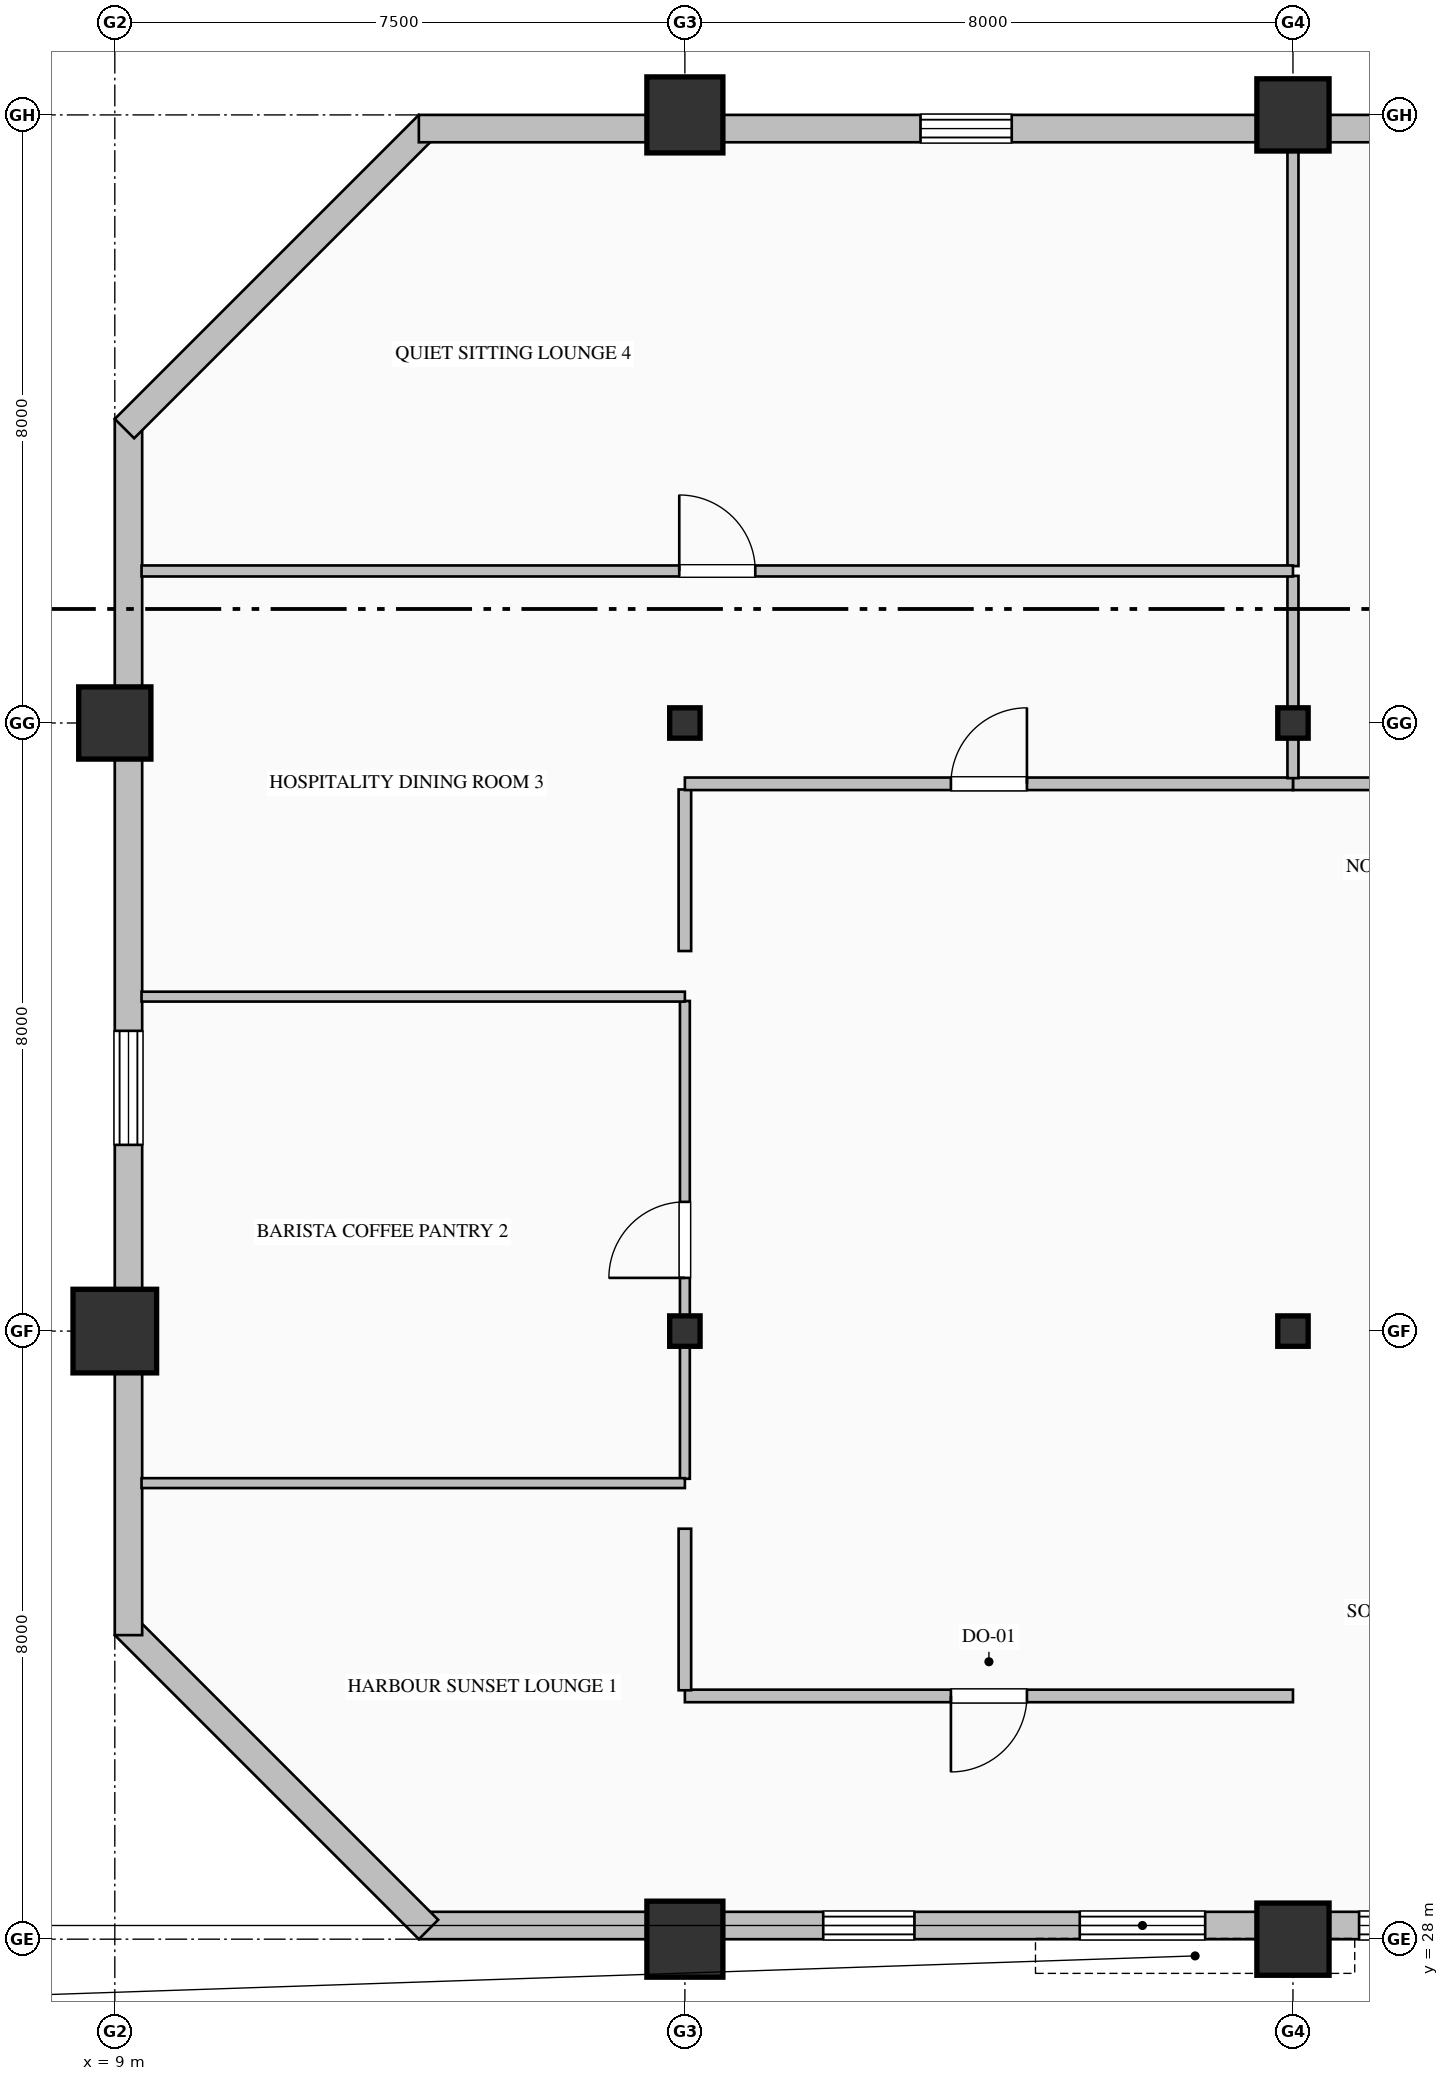
"""IFC4 building model, lengths in metres.
Left out: names, types, materials, properties, quantities, classifications, styles, units other than length and angle.
Written with IfcOpenShell. Run it as: python <this file> out.ifc"""

import sys

from ifc_helpers import new_model, si_unit, direction, frame, frame_2d, origin, origin_2d, place, context, subcontext, project, spatial, rectangle, hollow_rectangle, hollow_circle, i_section, extrude, element, fill, save


model = new_model("IFC4")
c1 = context("Model", 3, precision=1e-05, world=origin(), true_north=direction((0.0, 1.0)))
c2 = subcontext(c1, "Body", "Model", "MODEL_VIEW")
j1 = project(units=[si_unit("LENGTHUNIT", "METRE"), si_unit("PLANEANGLEUNIT", "RADIAN")], contexts=[c1])
p1 = place(None, origin())
s1 = spatial("IfcSite", under=j1, at=p1, CompositionType="ELEMENT")
p2 = place(p1, origin())
s2 = spatial("IfcBuilding", under=s1, at=p2, CompositionType="ELEMENT")
p3 = place(p2, frame((0.0, 0.0, 159.0)))
s3 = spatial("IfcBuildingStorey", under=s2, at=p3, CompositionType="ELEMENT", Elevation=159.0)
p4 = place(p3, frame((9.0, 36.0, 0.0), z_axis=(0.0, 0.0, 1.0), x_axis=(1.0, 0.0, 0.0)))
e1 = element("IfcColumn", 1, at=p4, inside=s3, PredefinedType="COLUMN", context=c2, shape_type="SweptSolid", body=[
    extrude(hollow_rectangle(XDim=1.1, YDim=1.1, WallThickness=0.04, at=origin_2d()), origin(), (0.0, 0.0, 1.0), 4.0),
])
p5 = place(p3, frame((9.0, 44.0, 0.0), z_axis=(0.0, 0.0, 1.0), x_axis=(1.0, 0.0, 0.0)))
e2 = element("IfcColumn", 2, at=p5, inside=s3, PredefinedType="COLUMN", context=c2, shape_type="SweptSolid", body=[
    extrude(hollow_rectangle(XDim=0.95, YDim=0.95, WallThickness=0.036, at=origin_2d()), origin(), (0.0, 0.0, 1.0), 4.0),
])
p6 = place(p3, frame((16.5, 28.0, 0.0), z_axis=(0.0, 0.0, 1.0), x_axis=(1.0, 0.0, 0.0)))
e3 = element("IfcColumn", 3, at=p6, inside=s3, PredefinedType="COLUMN", context=c2, shape_type="SweptSolid", body=[
    extrude(hollow_circle(Radius=0.5, WallThickness=0.036, at=origin_2d()), origin(), (0.0, 0.0, 1.0), 4.0),
])
for number, where, z_axis, x_axis in (
    (4, (16.5, 36.0, 0.0), (0.0, 0.0, 1.0), (1.0, 0.0, 0.0)),
    (5, (16.5, 44.0, 0.0), (0.0, 0.0, 1.0), (1.0, 0.0, 0.0)),
):
    element("IfcColumn", number, at=place(p3, frame(where, z_axis=z_axis, x_axis=x_axis)), inside=s3, PredefinedType="COLUMN", context=c2, shape_type="SweptSolid", body=[
        extrude(i_section(OverallWidth=0.4, OverallDepth=0.4, WebThickness=0.013, FlangeThickness=0.021, FilletRadius=0.022, at=origin_2d()), origin(), (0.0, 0.0, 1.0), 4.0),
    ])
p7 = place(p3, frame((16.5, 52.0, 0.0), z_axis=(0.0, 0.0, 1.0), x_axis=(1.0, 0.0, 0.0)))
e6 = element("IfcColumn", 6, at=p7, inside=s3, PredefinedType="COLUMN", context=c2, shape_type="SweptSolid", body=[
    extrude(hollow_circle(Radius=0.5, WallThickness=0.036, at=origin_2d()), origin(), (0.0, 0.0, 1.0), 4.0),
])
p8 = place(p3, frame((24.5, 28.0, 0.0), z_axis=(0.0, 0.0, 1.0), x_axis=(1.0, 0.0, 0.0)))
e7 = element("IfcColumn", 7, at=p8, inside=s3, PredefinedType="COLUMN", context=c2, shape_type="SweptSolid", body=[
    extrude(hollow_rectangle(XDim=0.95, YDim=0.95, WallThickness=0.036, at=origin_2d()), origin(), (0.0, 0.0, 1.0), 4.0),
])
for number, where, z_axis, x_axis in (
    (8, (24.5, 36.0, 0.0), (0.0, 0.0, 1.0), (1.0, 0.0, 0.0)),
    (9, (24.5, 44.0, 0.0), (0.0, 0.0, 1.0), (1.0, 0.0, 0.0)),
):
    element("IfcColumn", number, at=place(p3, frame(where, z_axis=z_axis, x_axis=x_axis)), inside=s3, PredefinedType="COLUMN", context=c2, shape_type="SweptSolid", body=[
        extrude(i_section(OverallWidth=0.4, OverallDepth=0.4, WebThickness=0.013, FlangeThickness=0.021, FilletRadius=0.022, at=origin_2d()), origin(), (0.0, 0.0, 1.0), 4.0),
    ])
p9 = place(p3, frame((24.5, 52.0, 0.0), z_axis=(0.0, 0.0, 1.0), x_axis=(1.0, 0.0, 0.0)))
e10 = element("IfcColumn", 10, at=p9, inside=s3, PredefinedType="COLUMN", context=c2, shape_type="SweptSolid", body=[
    extrude(hollow_rectangle(XDim=0.95, YDim=0.95, WallThickness=0.036, at=origin_2d()), origin(), (0.0, 0.0, 1.0), 4.0),
])
p10 = place(p3, frame((40.52, 28.18, 0.0), z_axis=(0.0, 0.0, 1.0), x_axis=(-1.0, 0.0, 0.0)))
e11 = element("IfcWall", 11, at=p10, inside=s3, PredefinedType="SOLIDWALL", context=c2, shape_type="SweptSolid", body=[
    extrude(rectangle(XDim=27.52, YDim=0.36, at=frame_2d((13.76, 0.0))), origin(), (0.0, 0.0, 1.0), 3.165),
])
p11 = place(p10, frame((2.85, 0.0, 0.85)))
e12 = element("IfcOpeningElement", 12, at=p11, cuts=e11, PredefinedType="OPENING", context=c2, shape_type="SweptSolid", body=[
    extrude(rectangle(XDim=1.5, YDim=1.95, at=frame_2d((0.75, 0.975))), frame((0.0, 0.19, 0.0), z_axis=(0.0, -1.0, 0.0), x_axis=(1.0, 0.0, 0.0)), (0.0, 0.0, 1.0), 0.38),
])
p12 = place(p10, frame((10.2, 0.0, 0.7)))
e13 = element("IfcOpeningElement", 13, at=p12, cuts=e11, PredefinedType="OPENING", context=c2, shape_type="SweptSolid", body=[
    extrude(rectangle(XDim=1.2, YDim=1.85, at=frame_2d((0.6, 0.925))), frame((0.0, 0.19, 0.0), z_axis=(0.0, -1.0, 0.0), x_axis=(1.0, 0.0, 0.0)), (0.0, 0.0, 1.0), 0.38),
])
p13 = place(p10, frame((13.65, 0.0, 0.85)))
e14 = element("IfcOpeningElement", 14, at=p13, cuts=e11, PredefinedType="OPENING", context=c2, shape_type="SweptSolid", body=[
    extrude(rectangle(XDim=1.5, YDim=1.95, at=frame_2d((0.75, 0.975))), frame((0.0, 0.19, 0.0), z_axis=(0.0, -1.0, 0.0), x_axis=(1.0, 0.0, 0.0)), (0.0, 0.0, 1.0), 0.38),
])
p14 = place(p10, frame((17.175, 0.0, 0.85)))
e15 = element("IfcOpeningElement", 15, at=p14, cuts=e11, PredefinedType="OPENING", context=c2, shape_type="SweptSolid", body=[
    extrude(rectangle(XDim=1.65, YDim=1.95, at=frame_2d((0.825, 0.975))), frame((0.0, 0.19, 0.0), z_axis=(0.0, -1.0, 0.0), x_axis=(1.0, 0.0, 0.0)), (0.0, 0.0, 1.0), 0.38),
])
p15 = place(p10, frame((21.0, 0.0, 0.7)))
e16 = element("IfcOpeningElement", 16, at=p15, cuts=e11, PredefinedType="OPENING", context=c2, shape_type="SweptSolid", body=[
    extrude(rectangle(XDim=1.2, YDim=1.85, at=frame_2d((0.6, 0.925))), frame((0.0, 0.19, 0.0), z_axis=(0.0, -1.0, 0.0), x_axis=(1.0, 0.0, 0.0)), (0.0, 0.0, 1.0), 0.38),
])
p16 = place(p3, frame((13.127, 28.127, 0.0), z_axis=(0.0, 0.0, 1.0), x_axis=(-0.707106781187, 0.707106781187, 0.0)))
e17 = element("IfcWall", 17, at=p16, inside=s3, PredefinedType="SOLIDWALL", context=c2, shape_type="SweptSolid", body=[
    extrude(rectangle(XDim=5.657, YDim=0.36, at=frame_2d((2.828, 0.0))), origin(), (0.0, 0.0, 1.0), 3.765),
])
p17 = place(p3, frame((9.18, 32.0, 0.0), z_axis=(0.0, 0.0, 1.0), x_axis=(0.0, 1.0, 0.0)))
e18 = element("IfcWall", 18, at=p17, inside=s3, PredefinedType="SOLIDWALL", context=c2, shape_type="SweptSolid", body=[
    extrude(rectangle(XDim=16.0, YDim=0.36, at=frame_2d((8.0, 0.0))), origin(), (0.0, 0.0, 1.0), 3.265),
])
p18 = place(p17, frame((6.45, 0.0, 0.85)))
e19 = element("IfcOpeningElement", 19, at=p18, cuts=e18, PredefinedType="OPENING", context=c2, shape_type="SweptSolid", body=[
    extrude(rectangle(XDim=1.5, YDim=1.95, at=frame_2d((0.75, 0.975))), frame((0.0, 0.19, 0.0), z_axis=(0.0, -1.0, 0.0), x_axis=(1.0, 0.0, 0.0)), (0.0, 0.0, 1.0), 0.38),
])
p19 = place(p3, frame((9.127, 47.873, 0.0), z_axis=(0.0, 0.0, 1.0), x_axis=(0.707106781187, 0.707106781187, 0.0)))
e20 = element("IfcWall", 20, at=p19, inside=s3, PredefinedType="SOLIDWALL", context=c2, shape_type="SweptSolid", body=[
    extrude(rectangle(XDim=5.657, YDim=0.36, at=frame_2d((2.828, 0.0))), origin(), (0.0, 0.0, 1.0), 3.765),
])
p20 = place(p3, frame((13.0, 51.82, 0.0), z_axis=(0.0, 0.0, 1.0), x_axis=(1.0, 0.0, 0.0)))
e21 = element("IfcWall", 21, at=p20, inside=s3, PredefinedType="SOLIDWALL", context=c2, shape_type="SweptSolid", body=[
    extrude(rectangle(XDim=27.52, YDim=0.36, at=frame_2d((13.76, 0.0))), origin(), (0.0, 0.0, 1.0), 3.265),
])
p21 = place(p20, frame((6.6, 0.0, 0.7)))
e22 = element("IfcOpeningElement", 22, at=p21, cuts=e21, PredefinedType="OPENING", context=c2, shape_type="SweptSolid", body=[
    extrude(rectangle(XDim=1.2, YDim=1.85, at=frame_2d((0.6, 0.925))), frame((0.0, 0.19, 0.0), z_axis=(0.0, -1.0, 0.0), x_axis=(1.0, 0.0, 0.0)), (0.0, 0.0, 1.0), 0.38),
])
p22 = place(p20, frame((13.575, 0.0, 0.85)))
e23 = element("IfcOpeningElement", 23, at=p22, cuts=e21, PredefinedType="OPENING", context=c2, shape_type="SweptSolid", body=[
    extrude(rectangle(XDim=1.65, YDim=1.95, at=frame_2d((0.825, 0.975))), frame((0.0, 0.19, 0.0), z_axis=(0.0, -1.0, 0.0), x_axis=(1.0, 0.0, 0.0)), (0.0, 0.0, 1.0), 0.38),
])
p23 = place(p3, frame((24.5, 31.2, 0.0), z_axis=(0.0, 0.0, 1.0), x_axis=(-1.0, 0.0, 0.0)))
e24 = element("IfcWall", 24, at=p23, inside=s3, PredefinedType="PARTITIONING", context=c2, shape_type="SweptSolid", body=[
    extrude(rectangle(XDim=8.0, YDim=0.165, at=frame_2d((4.0, 0.0))), origin(), (0.0, 0.0, 1.0), 3.765),
])
p24 = place(p23, frame((3.5, 0.0, 0.0)))
e25 = element("IfcOpeningElement", 25, at=p24, cuts=e24, PredefinedType="OPENING", context=c2, shape_type="SweptSolid", body=[
    extrude(rectangle(XDim=1.0, YDim=2.15, at=frame_2d((0.5, 1.075))), frame((0.0, 0.093, 0.0), z_axis=(0.0, -1.0, 0.0), x_axis=(1.0, 0.0, 0.0)), (0.0, 0.0, 1.0), 0.185),
])
p25 = place(p3, frame((16.5, 31.274, 0.0), z_axis=(0.0, 0.0, 1.0), x_axis=(0.0, 1.0, 0.0)))
e26 = element("IfcWall", 26, at=p25, inside=s3, PredefinedType="PARTITIONING", context=c2, shape_type="SweptSolid", body=[
    extrude(rectangle(XDim=2.125, YDim=0.165, at=frame_2d((1.063, 0.0))), origin(), (0.0, 0.0, 1.0), 3.157),
])
p26 = place(p3, frame((24.5, 43.2, 0.0), z_axis=(0.0, 0.0, 1.0), x_axis=(1.0, 0.0, 0.0)))
e27 = element("IfcWall", 27, at=p26, inside=s3, PredefinedType="PARTITIONING", context=c2, shape_type="SweptSolid", body=[
    extrude(rectangle(XDim=13.3, YDim=0.165, at=frame_2d((6.65, 0.0))), origin(), (0.0, 0.0, 1.0), 3.765),
])
p27 = place(p26, frame((6.15, 0.0, 0.0)))
e28 = element("IfcOpeningElement", 28, at=p27, cuts=e27, PredefinedType="OPENING", context=c2, shape_type="SweptSolid", body=[
    extrude(rectangle(XDim=1.0, YDim=2.15, at=frame_2d((0.5, 1.075))), frame((0.0, 0.093, 0.0), z_axis=(0.0, -1.0, 0.0), x_axis=(1.0, 0.0, 0.0)), (0.0, 0.0, 1.0), 0.185),
])
p28 = place(p3, frame((16.5, 41.0, 0.0), z_axis=(0.0, 0.0, 1.0), x_axis=(0.0, 1.0, 0.0)))
e29 = element("IfcWall", 29, at=p28, inside=s3, PredefinedType="PARTITIONING", context=c2, shape_type="SweptSolid", body=[
    extrude(rectangle(XDim=2.125, YDim=0.165, at=frame_2d((1.063, 0.0))), origin(), (0.0, 0.0, 1.0), 3.157),
])
p29 = place(p3, frame((16.5, 43.2, 0.0), z_axis=(0.0, 0.0, 1.0), x_axis=(1.0, 0.0, 0.0)))
e30 = element("IfcWall", 30, at=p29, inside=s3, PredefinedType="PARTITIONING", context=c2, shape_type="SweptSolid", body=[
    extrude(rectangle(XDim=8.0, YDim=0.165, at=frame_2d((4.0, 0.0))), origin(), (0.0, 0.0, 1.0), 3.765),
])
p30 = place(p29, frame((3.5, 0.0, 0.0)))
e31 = element("IfcOpeningElement", 31, at=p30, cuts=e30, PredefinedType="OPENING", context=c2, shape_type="SweptSolid", body=[
    extrude(rectangle(XDim=1.0, YDim=2.15, at=frame_2d((0.5, 1.075))), frame((0.0, 0.093, 0.0), z_axis=(0.0, -1.0, 0.0), x_axis=(1.0, 0.0, 0.0)), (0.0, 0.0, 1.0), 0.185),
])
p31 = place(p3, frame((16.5, 34.057, 0.0), z_axis=(0.0, 0.0, 1.0), x_axis=(0.0, 1.0, 0.0)))
e32 = element("IfcWall", 32, at=p31, inside=s3, PredefinedType="PARTITIONING", context=c2, shape_type="SweptSolid", body=[
    extrude(rectangle(XDim=6.286, YDim=0.13, at=frame_2d((3.143, 0.0))), origin(), (0.0, 0.0, 1.0), 3.157),
])
p32 = place(p31, frame((2.643, 0.0, 0.0)))
e33 = element("IfcOpeningElement", 33, at=p32, cuts=e32, PredefinedType="OPENING", context=c2, shape_type="SweptSolid", body=[
    extrude(rectangle(XDim=1.0, YDim=2.15, at=frame_2d((0.5, 1.075))), frame((0.0, 0.075, 0.0), z_axis=(0.0, -1.0, 0.0), x_axis=(1.0, 0.0, 0.0)), (0.0, 0.0, 1.0), 0.15),
])
p33 = place(p3, frame((24.5, 43.274, 0.0), z_axis=(0.0, 0.0, 1.0), x_axis=(0.0, 1.0, 0.0)))
e34 = element("IfcWall", 34, at=p33, inside=s3, PredefinedType="PARTITIONING", context=c2, shape_type="SweptSolid", body=[
    extrude(rectangle(XDim=2.661, YDim=0.145, at=frame_2d((1.331, 0.0))), origin(), (0.0, 0.0, 1.0), 3.157),
])
p34 = place(p3, frame((24.5, 46.064, 0.0), z_axis=(0.0, 0.0, 1.0), x_axis=(0.0, 1.0, 0.0)))
e35 = element("IfcWall", 35, at=p34, inside=s3, PredefinedType="PARTITIONING", context=c2, shape_type="SweptSolid", body=[
    extrude(rectangle(XDim=5.583, YDim=0.145, at=frame_2d((2.792, 0.0))), origin(), (0.0, 0.0, 1.0), 3.157),
])
for number, where, z_axis, x_axis in (
    (36, (9.352, 34.0, 0.0), (0.0, 0.0, 1.0), (1.0, 0.0, 0.0)),
    (37, (9.352, 40.4, 0.0), (0.0, 0.0, 1.0), (1.0, 0.0, 0.0)),
):
    element("IfcWall", number, at=place(p3, frame(where, z_axis=z_axis, x_axis=x_axis)), inside=s3, PredefinedType="PARTITIONING", context=c2, shape_type="SweptSolid", body=[
        extrude(rectangle(XDim=7.148, YDim=0.13, at=frame_2d((3.574, 0.0))), origin(), (0.0, 0.0, 1.0), 3.765),
    ])
p35 = place(p3, frame((9.352, 46.0, 0.0), z_axis=(0.0, 0.0, 1.0), x_axis=(1.0, 0.0, 0.0)))
e38 = element("IfcWall", 38, at=p35, inside=s3, PredefinedType="PARTITIONING", context=c2, shape_type="SweptSolid", body=[
    extrude(rectangle(XDim=15.148, YDim=0.145, at=frame_2d((7.574, 0.0))), origin(), (0.0, 0.0, 1.0), 3.765),
])
p36 = place(p35, frame((7.074, 0.0, 0.0)))
e39 = element("IfcOpeningElement", 39, at=p36, cuts=e38, PredefinedType="OPENING", context=c2, shape_type="SweptSolid", body=[
    extrude(rectangle(XDim=1.0, YDim=2.15, at=frame_2d((0.5, 1.075))), frame((0.0, 0.083, 0.0), z_axis=(0.0, -1.0, 0.0), x_axis=(1.0, 0.0, 0.0)), (0.0, 0.0, 1.0), 0.165),
])
p37 = place(p13, origin())
e40 = element("IfcWindow", 40, at=p37, inside=s3, PartitioningType="DOUBLE_PANEL_VERTICAL", PredefinedType="WINDOW", context=c2, shape_type="SweptSolid", body=[
    extrude(rectangle(XDim=1.5, YDim=1.95, at=frame_2d((0.75, 0.975))), frame((0.0, 0.15, 0.0), z_axis=(0.0, -1.0, 0.0), x_axis=(1.0, 0.0, 0.0)), (0.0, 0.0, 1.0), 0.06),
])
fill(e14, e40)
p38 = place(p14, origin())
e41 = element("IfcWindow", 41, at=p38, inside=s3, PartitioningType="DOUBLE_PANEL_VERTICAL", PredefinedType="WINDOW", context=c2, shape_type="SweptSolid", body=[
    extrude(rectangle(XDim=1.65, YDim=1.95, at=frame_2d((0.825, 0.975))), frame((0.0, 0.15, 0.0), z_axis=(0.0, -1.0, 0.0), x_axis=(1.0, 0.0, 0.0)), (0.0, 0.0, 1.0), 0.06),
])
fill(e15, e41)
p39 = place(p15, origin())
e42 = element("IfcWindow", 42, at=p39, inside=s3, PartitioningType="DOUBLE_PANEL_VERTICAL", PredefinedType="WINDOW", context=c2, shape_type="SweptSolid", body=[
    extrude(rectangle(XDim=1.2, YDim=1.85, at=frame_2d((0.6, 0.925))), frame((0.0, 0.15, 0.0), z_axis=(0.0, -1.0, 0.0), x_axis=(1.0, 0.0, 0.0)), (0.0, 0.0, 1.0), 0.06),
])
fill(e16, e42)
p40 = place(p18, origin())
e43 = element("IfcWindow", 43, at=p40, inside=s3, PartitioningType="DOUBLE_PANEL_VERTICAL", PredefinedType="WINDOW", context=c2, shape_type="SweptSolid", body=[
    extrude(rectangle(XDim=1.5, YDim=1.95, at=frame_2d((0.75, 0.975))), frame((0.0, 0.15, 0.0), z_axis=(0.0, -1.0, 0.0), x_axis=(1.0, 0.0, 0.0)), (0.0, 0.0, 1.0), 0.06),
])
fill(e19, e43)
p41 = place(p21, origin())
e44 = element("IfcWindow", 44, at=p41, inside=s3, PartitioningType="DOUBLE_PANEL_VERTICAL", PredefinedType="WINDOW", context=c2, shape_type="SweptSolid", body=[
    extrude(rectangle(XDim=1.2, YDim=1.85, at=frame_2d((0.6, 0.925))), frame((0.0, 0.15, 0.0), z_axis=(0.0, -1.0, 0.0), x_axis=(1.0, 0.0, 0.0)), (0.0, 0.0, 1.0), 0.06),
])
fill(e22, e44)
p42 = place(p24, origin())
e45 = element("IfcDoor", 45, at=p42, inside=s3, OperationType="SINGLE_SWING_RIGHT", PredefinedType="DOOR", context=c2, shape_type="SweptSolid", body=[
    extrude(rectangle(XDim=1.0, YDim=2.15, at=frame_2d((0.5, 1.075))), frame((0.0, 0.025, 0.0), z_axis=(0.0, -1.0, 0.0), x_axis=(1.0, 0.0, 0.0)), (0.0, 0.0, 1.0), 0.05),
])
fill(e25, e45)
p43 = place(p32, origin())
e46 = element("IfcDoor", 46, at=p43, inside=s3, OperationType="SINGLE_SWING_LEFT", PredefinedType="DOOR", context=c2, shape_type="SweptSolid", body=[
    extrude(rectangle(XDim=1.0, YDim=2.15, at=frame_2d((0.5, 1.075))), frame((0.0, 0.025, 0.0), z_axis=(0.0, -1.0, 0.0), x_axis=(1.0, 0.0, 0.0)), (0.0, 0.0, 1.0), 0.05),
])
fill(e33, e46)
p44 = place(p30, origin())
e47 = element("IfcDoor", 47, at=p44, inside=s3, OperationType="SINGLE_SWING_RIGHT", PredefinedType="DOOR", context=c2, shape_type="SweptSolid", body=[
    extrude(rectangle(XDim=1.0, YDim=2.15, at=frame_2d((0.5, 1.075))), frame((0.0, 0.025, 0.0), z_axis=(0.0, -1.0, 0.0), x_axis=(1.0, 0.0, 0.0)), (0.0, 0.0, 1.0), 0.05),
])
fill(e31, e47)
p45 = place(p36, origin())
e48 = element("IfcDoor", 48, at=p45, inside=s3, OperationType="SINGLE_SWING_LEFT", PredefinedType="DOOR", context=c2, shape_type="SweptSolid", body=[
    extrude(rectangle(XDim=1.0, YDim=2.15, at=frame_2d((0.5, 1.075))), frame((0.0, 0.025, 0.0), z_axis=(0.0, -1.0, 0.0), x_axis=(1.0, 0.0, 0.0)), (0.0, 0.0, 1.0), 0.05),
])
fill(e39, e48)
save(model, sys.argv[1])
